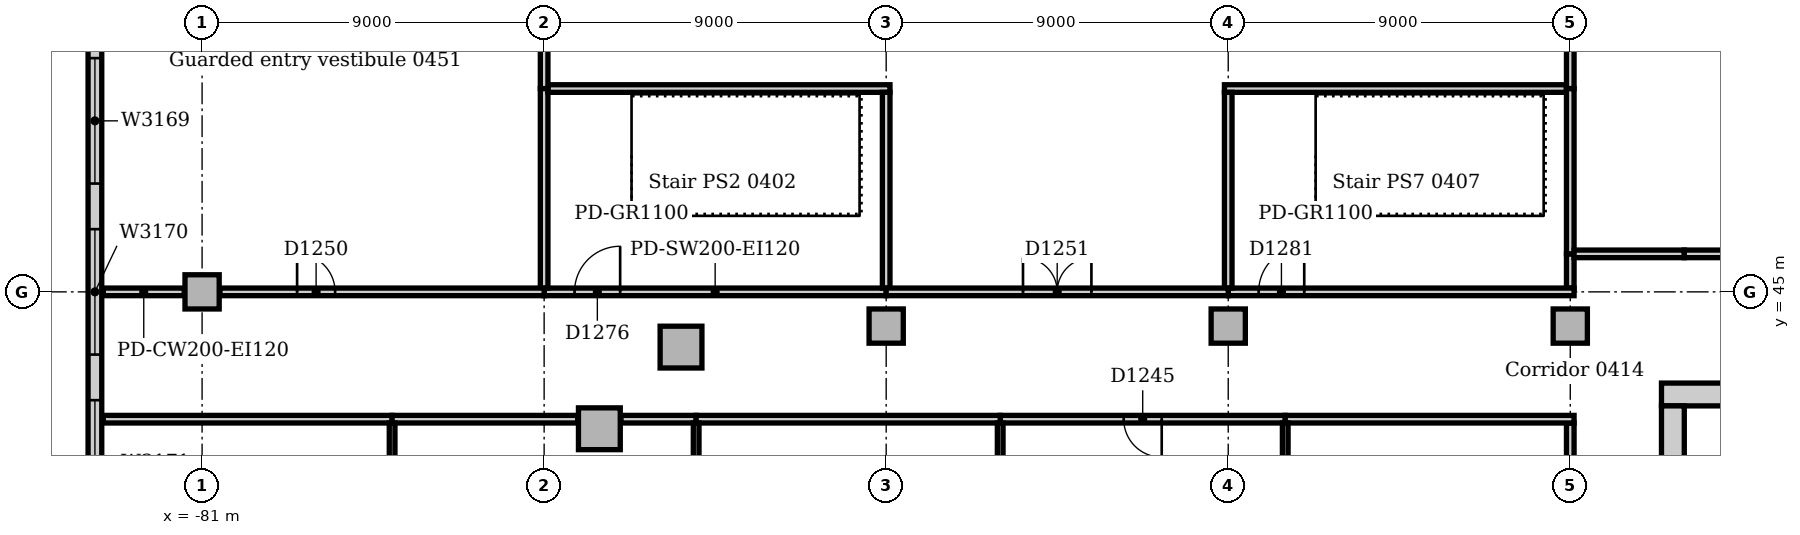
"""IFC4 building model, lengths in metres.
Left out: names, types, materials, properties, quantities, classifications, styles, units other than length and angle.
Written with IfcOpenShell. Run it as: python <this file> out.ifc"""

import sys

from ifc_helpers import new_model, si_unit, direction, frame, frame_2d, origin, origin_2d, place, context, subcontext, project, spatial, rectangle, extrude, element, fill, save


model = new_model("IFC4")
c1 = context("Model", 3, precision=1e-05, world=origin(), true_north=direction((0.0, 1.0)))
c2 = subcontext(c1, "Body", "Model", "MODEL_VIEW")
j1 = project(units=[si_unit("LENGTHUNIT", "METRE"), si_unit("PLANEANGLEUNIT", "RADIAN")], contexts=[c1])
p1 = place(None, origin())
s1 = spatial("IfcSite", under=j1, at=p1, CompositionType="ELEMENT")
p2 = place(p1, origin())
s2 = spatial("IfcBuilding", under=s1, at=p2, CompositionType="ELEMENT")
p3 = place(p2, frame((0.0, 0.0, 21.0)))
s3 = spatial("IfcBuildingStorey", under=s2, at=p3, CompositionType="ELEMENT", Elevation=21.0)
p4 = place(p3, frame((-30.9, 42.3, 0.0), z_axis=(0.0, 0.0, 1.0), x_axis=(-1.0, 0.0, 0.0)))
e1 = element("IfcWall", 1, at=p4, inside=s3, PredefinedType="SOLIDWALL", context=c2, shape_type="SweptSolid", body=[
    extrude(rectangle(XDim=11.7, YDim=0.6, at=frame_2d((5.85, 0.0))), origin(), (0.0, 0.0, 1.0), 5.0),
])
p5 = place(p3, frame((-42.3, 42.0, 0.0), z_axis=(0.0, 0.0, 1.0), x_axis=(0.0, -1.0, 0.0)))
e2 = element("IfcWall", 2, at=p5, inside=s3, PredefinedType="SOLIDWALL", context=c2, shape_type="SweptSolid", body=[
    extrude(rectangle(XDim=11.5, YDim=0.6, at=frame_2d((5.75, 0.0))), origin(), (0.0, 0.0, 1.0), 5.0),
])
p6 = place(p5, frame((8.85, 0.0, 0.0)))
e3 = element("IfcOpeningElement", 3, at=p6, cuts=e2, PredefinedType="OPENING", context=c2, shape_type="SweptSolid", body=[
    extrude(rectangle(XDim=1.8, YDim=2.1, at=frame_2d((0.9, 1.05))), frame((0.0, 0.31, 0.0), z_axis=(0.0, -1.0, 0.0), x_axis=(1.0, 0.0, 0.0)), (0.0, 0.0, 1.0), 0.62),
])
for number, where, z_axis, x_axis in (
    (4, (-68.398, 43.547, 0.0), (0.0, 0.0, 1.0), (1.0, 0.0, 0.0)),
    (5, (-70.547, 41.398, 0.0), (0.0, 0.0, 1.0), (1.0, 0.0, 0.0)),
):
    element("IfcColumn", number, at=place(p3, frame(where, z_axis=z_axis, x_axis=x_axis)), inside=s3, PredefinedType="COLUMN", context=c2, shape_type="SweptSolid", body=[
        extrude(rectangle(XDim=1.1, YDim=1.1, at=origin_2d()), origin(), (0.0, 0.0, 1.0), 4.85),
    ])
for number, where, z_axis, x_axis in (
    (6, (-63.0, 44.1, 0.0), (0.0, 0.0, 1.0), (1.0, 0.0, 0.0)),
    (7, (-54.0, 44.1, 0.0), (0.0, 0.0, 1.0), (1.0, 0.0, 0.0)),
    (8, (-45.0, 44.1, 0.0), (0.0, 0.0, 1.0), (1.0, 0.0, 0.0)),
):
    element("IfcColumn", number, at=place(p3, frame(where, z_axis=z_axis, x_axis=x_axis)), inside=s3, PredefinedType="COLUMN", context=c2, shape_type="SweptSolid", body=[
        extrude(rectangle(XDim=0.9, YDim=0.9, at=origin_2d()), origin(), (0.0, 0.0, 1.0), 4.85),
    ])
p7 = place(p3, frame((-81.0, 45.0, 0.0), z_axis=(0.0, 0.0, 1.0), x_axis=(1.0, 0.0, 0.0)))
e9 = element("IfcColumn", 9, at=p7, inside=s3, PredefinedType="COLUMN", context=c2, shape_type="SweptSolid", body=[
    extrude(rectangle(XDim=0.9, YDim=0.9, at=origin_2d()), origin(), (0.0, 0.0, 1.0), 4.7),
])
p8 = place(p3, frame((-83.82, 54.0, 0.0), z_axis=(0.0, 0.0, 1.0), x_axis=(0.0, -1.0, 0.0)))
e10 = element("IfcWall", 10, at=p8, inside=s3, PredefinedType="STANDARD", context=c2, shape_type="SweptSolid", body=[
    extrude(rectangle(XDim=63.0, YDim=0.36, at=frame_2d((31.5, 0.0))), origin(), (0.0, 0.0, 1.0), 4.85),
])
p9 = place(p8, frame((2.85, 0.0, 0.9)))
e11 = element("IfcOpeningElement", 11, at=p9, cuts=e10, PredefinedType="OPENING", context=c2, shape_type="SweptSolid", body=[
    extrude(rectangle(XDim=3.3, YDim=2.4, at=frame_2d((1.65, 1.2))), frame((0.0, 0.19, 0.0), z_axis=(0.0, -1.0, 0.0), x_axis=(1.0, 0.0, 0.0)), (0.0, 0.0, 1.0), 0.38),
])
p10 = place(p8, frame((7.35, 0.0, 0.9)))
e12 = element("IfcOpeningElement", 12, at=p10, cuts=e10, PredefinedType="OPENING", context=c2, shape_type="SweptSolid", body=[
    extrude(rectangle(XDim=3.3, YDim=2.4, at=frame_2d((1.65, 1.2))), frame((0.0, 0.19, 0.0), z_axis=(0.0, -1.0, 0.0), x_axis=(1.0, 0.0, 0.0)), (0.0, 0.0, 1.0), 0.38),
])
p11 = place(p8, frame((11.85, 0.0, 0.9)))
e13 = element("IfcOpeningElement", 13, at=p11, cuts=e10, PredefinedType="OPENING", context=c2, shape_type="SweptSolid", body=[
    extrude(rectangle(XDim=3.3, YDim=2.4, at=frame_2d((1.65, 1.2))), frame((0.0, 0.19, 0.0), z_axis=(0.0, -1.0, 0.0), x_axis=(1.0, 0.0, 0.0)), (0.0, 0.0, 1.0), 0.38),
])
p12 = place(p8, frame((16.35, 0.0, 0.9)))
e14 = element("IfcOpeningElement", 14, at=p12, cuts=e10, PredefinedType="OPENING", context=c2, shape_type="SweptSolid", body=[
    extrude(rectangle(XDim=3.3, YDim=2.4, at=frame_2d((1.65, 1.2))), frame((0.0, 0.19, 0.0), z_axis=(0.0, -1.0, 0.0), x_axis=(1.0, 0.0, 0.0)), (0.0, 0.0, 1.0), 0.38),
])
p13 = place(p8, frame((20.85, 0.0, 0.9)))
e15 = element("IfcOpeningElement", 15, at=p13, cuts=e10, PredefinedType="OPENING", context=c2, shape_type="SweptSolid", body=[
    extrude(rectangle(XDim=3.3, YDim=2.4, at=frame_2d((1.65, 1.2))), frame((0.0, 0.19, 0.0), z_axis=(0.0, -1.0, 0.0), x_axis=(1.0, 0.0, 0.0)), (0.0, 0.0, 1.0), 0.38),
])
p14 = place(p8, frame((25.35, 0.0, 0.9)))
e16 = element("IfcOpeningElement", 16, at=p14, cuts=e10, PredefinedType="OPENING", context=c2, shape_type="SweptSolid", body=[
    extrude(rectangle(XDim=3.3, YDim=2.4, at=frame_2d((1.65, 1.2))), frame((0.0, 0.19, 0.0), z_axis=(0.0, -1.0, 0.0), x_axis=(1.0, 0.0, 0.0)), (0.0, 0.0, 1.0), 0.38),
])
p15 = place(p8, frame((29.85, 0.0, 0.9)))
e17 = element("IfcOpeningElement", 17, at=p15, cuts=e10, PredefinedType="OPENING", context=c2, shape_type="SweptSolid", body=[
    extrude(rectangle(XDim=3.3, YDim=2.4, at=frame_2d((1.65, 1.2))), frame((0.0, 0.19, 0.0), z_axis=(0.0, -1.0, 0.0), x_axis=(1.0, 0.0, 0.0)), (0.0, 0.0, 1.0), 0.38),
])
p16 = place(p8, frame((34.35, 0.0, 0.9)))
e18 = element("IfcOpeningElement", 18, at=p16, cuts=e10, PredefinedType="OPENING", context=c2, shape_type="SweptSolid", body=[
    extrude(rectangle(XDim=3.3, YDim=2.4, at=frame_2d((1.65, 1.2))), frame((0.0, 0.19, 0.0), z_axis=(0.0, -1.0, 0.0), x_axis=(1.0, 0.0, 0.0)), (0.0, 0.0, 1.0), 0.38),
])
p17 = place(p8, frame((38.85, 0.0, 0.9)))
e19 = element("IfcOpeningElement", 19, at=p17, cuts=e10, PredefinedType="OPENING", context=c2, shape_type="SweptSolid", body=[
    extrude(rectangle(XDim=3.3, YDim=2.4, at=frame_2d((1.65, 1.2))), frame((0.0, 0.19, 0.0), z_axis=(0.0, -1.0, 0.0), x_axis=(1.0, 0.0, 0.0)), (0.0, 0.0, 1.0), 0.38),
])
p18 = place(p8, frame((43.35, 0.0, 0.9)))
e20 = element("IfcOpeningElement", 20, at=p18, cuts=e10, PredefinedType="OPENING", context=c2, shape_type="SweptSolid", body=[
    extrude(rectangle(XDim=3.3, YDim=2.4, at=frame_2d((1.65, 1.2))), frame((0.0, 0.19, 0.0), z_axis=(0.0, -1.0, 0.0), x_axis=(1.0, 0.0, 0.0)), (0.0, 0.0, 1.0), 0.38),
])
p19 = place(p8, frame((47.85, 0.0, 0.9)))
e21 = element("IfcOpeningElement", 21, at=p19, cuts=e10, PredefinedType="OPENING", context=c2, shape_type="SweptSolid", body=[
    extrude(rectangle(XDim=3.3, YDim=2.4, at=frame_2d((1.65, 1.2))), frame((0.0, 0.19, 0.0), z_axis=(0.0, -1.0, 0.0), x_axis=(1.0, 0.0, 0.0)), (0.0, 0.0, 1.0), 0.38),
])
p20 = place(p8, frame((52.35, 0.0, 0.9)))
e22 = element("IfcOpeningElement", 22, at=p20, cuts=e10, PredefinedType="OPENING", context=c2, shape_type="SweptSolid", body=[
    extrude(rectangle(XDim=3.3, YDim=2.4, at=frame_2d((1.65, 1.2))), frame((0.0, 0.19, 0.0), z_axis=(0.0, -1.0, 0.0), x_axis=(1.0, 0.0, 0.0)), (0.0, 0.0, 1.0), 0.38),
])
p21 = place(p8, frame((56.85, 0.0, 0.9)))
e23 = element("IfcOpeningElement", 23, at=p21, cuts=e10, PredefinedType="OPENING", context=c2, shape_type="SweptSolid", body=[
    extrude(rectangle(XDim=3.3, YDim=2.4, at=frame_2d((1.65, 1.2))), frame((0.0, 0.19, 0.0), z_axis=(0.0, -1.0, 0.0), x_axis=(1.0, 0.0, 0.0)), (0.0, 0.0, 1.0), 0.38),
])
p22 = place(p3, frame((-72.0, 45.0, 0.0), z_axis=(0.0, 0.0, 1.0), x_axis=(1.0, 0.0, 0.0)))
e24 = element("IfcWall", 24, at=p22, inside=s3, PredefinedType="SOLIDWALL", context=c2, shape_type="SweptSolid", body=[
    extrude(rectangle(XDim=9.0, YDim=0.2, at=frame_2d((4.5, 0.0))), origin(), (0.0, 0.0, 1.0), 4.7),
])
p23 = place(p22, frame((0.8, 0.0, 0.0)))
e25 = element("IfcOpeningElement", 25, at=p23, cuts=e24, PredefinedType="OPENING", context=c2, shape_type="SweptSolid", body=[
    extrude(rectangle(XDim=1.2, YDim=2.1, at=frame_2d((0.6, 1.05))), frame((0.0, 0.11, 0.0), z_axis=(0.0, -1.0, 0.0), x_axis=(1.0, 0.0, 0.0)), (0.0, 0.0, 1.0), 0.22),
])
p24 = place(p3, frame((-72.0, 45.1, 0.0), z_axis=(0.0, 0.0, 1.0), x_axis=(0.0, 1.0, 0.0)))
e26 = element("IfcWall", 26, at=p24, inside=s3, PredefinedType="SOLIDWALL", context=c2, shape_type="SweptSolid", body=[
    extrude(rectangle(XDim=5.25, YDim=0.2, at=frame_2d((2.625, 0.0))), origin(), (0.0, 0.0, 1.0), 4.7),
])
p25 = place(p3, frame((-71.9, 50.35, 0.0), z_axis=(0.0, 0.0, 1.0), x_axis=(1.0, 0.0, 0.0)))
e27 = element("IfcWall", 27, at=p25, inside=s3, PredefinedType="SOLIDWALL", context=c2, shape_type="SweptSolid", body=[
    extrude(rectangle(XDim=9.0, YDim=0.2, at=frame_2d((4.5, 0.0))), origin(), (0.0, 0.0, 1.0), 4.7),
])
p26 = place(p3, frame((-63.0, 45.1, 0.0), z_axis=(0.0, 0.0, 1.0), x_axis=(0.0, 1.0, 0.0)))
e28 = element("IfcWall", 28, at=p26, inside=s3, PredefinedType="SOLIDWALL", context=c2, shape_type="SweptSolid", body=[
    extrude(rectangle(XDim=5.15, YDim=0.2, at=frame_2d((2.575, 0.0))), origin(), (0.0, 0.0, 1.0), 4.7),
])
p27 = place(p3, frame((-45.0, 45.1, 0.0), z_axis=(0.0, 0.0, 1.0), x_axis=(0.0, 1.0, 0.0)))
e29 = element("IfcWall", 29, at=p27, inside=s3, PredefinedType="SOLIDWALL", context=c2, shape_type="SweptSolid", body=[
    extrude(rectangle(XDim=0.9, YDim=0.2, at=frame_2d((0.45, 0.0))), origin(), (0.0, 0.0, 1.0), 4.7),
])
p28 = place(p3, frame((-54.0, 45.0, 0.0), z_axis=(0.0, 0.0, 1.0), x_axis=(1.0, 0.0, 0.0)))
e30 = element("IfcWall", 30, at=p28, inside=s3, PredefinedType="SOLIDWALL", context=c2, shape_type="SweptSolid", body=[
    extrude(rectangle(XDim=9.1, YDim=0.2, at=frame_2d((4.55, 0.0))), origin(), (0.0, 0.0, 1.0), 4.85),
])
p29 = place(p28, frame((0.8, 0.0, 0.0)))
e31 = element("IfcOpeningElement", 31, at=p29, cuts=e30, PredefinedType="OPENING", context=c2, shape_type="SweptSolid", body=[
    extrude(rectangle(XDim=1.2, YDim=2.1, at=frame_2d((0.6, 1.05))), frame((0.0, 0.11, 0.0), z_axis=(0.0, -1.0, 0.0), x_axis=(1.0, 0.0, 0.0)), (0.0, 0.0, 1.0), 0.22),
])
p30 = place(p3, frame((-54.1, 50.35, 0.0), z_axis=(0.0, 0.0, 1.0), x_axis=(1.0, 0.0, 0.0)))
e32 = element("IfcWall", 32, at=p30, inside=s3, PredefinedType="SOLIDWALL", context=c2, shape_type="SweptSolid", body=[
    extrude(rectangle(XDim=9.0, YDim=0.2, at=frame_2d((4.5, 0.0))), origin(), (0.0, 0.0, 1.0), 4.7),
])
p31 = place(p3, frame((-54.0, 45.1, 0.0), z_axis=(0.0, 0.0, 1.0), x_axis=(0.0, 1.0, 0.0)))
e33 = element("IfcWall", 33, at=p31, inside=s3, PredefinedType="SOLIDWALL", context=c2, shape_type="SweptSolid", body=[
    extrude(rectangle(XDim=5.15, YDim=0.2, at=frame_2d((2.575, 0.0))), origin(), (0.0, 0.0, 1.0), 4.7),
])
p32 = place(p3, frame((-45.0, 46.0, 0.0), z_axis=(0.0, 0.0, 1.0), x_axis=(0.0, 1.0, 0.0)))
e34 = element("IfcWall", 34, at=p32, inside=s3, PredefinedType="SOLIDWALL", context=c2, shape_type="SweptSolid", body=[
    extrude(rectangle(XDim=4.35, YDim=0.2, at=frame_2d((2.175, 0.0))), origin(), (0.0, 0.0, 1.0), 4.7),
])
p33 = place(p3, frame((-45.0, 36.42, 0.0), z_axis=(0.0, 0.0, 1.0), x_axis=(0.0, 1.0, 0.0)))
e35 = element("IfcWall", 35, at=p33, inside=s3, PredefinedType="PARTITIONING", context=c2, shape_type="SweptSolid", body=[
    extrude(rectangle(XDim=5.13, YDim=0.2, at=frame_2d((2.565, 0.0))), origin(), (0.0, 0.0, 1.0), 4.158),
])
p34 = place(p3, frame((-60.0, 41.65, 0.0), z_axis=(0.0, 0.0, 1.0), x_axis=(1.0, 0.0, 0.0)))
e36 = element("IfcWall", 36, at=p34, inside=s3, PredefinedType="PARTITIONING", context=c2, shape_type="SweptSolid", body=[
    extrude(rectangle(XDim=7.5, YDim=0.2, at=frame_2d((3.75, 0.0))), origin(), (0.0, 0.0, 1.0), 4.85),
])
p35 = place(p34, frame((3.25, 0.0, 0.0)))
e37 = element("IfcOpeningElement", 37, at=p35, cuts=e36, PredefinedType="OPENING", context=c2, shape_type="SweptSolid", body=[
    extrude(rectangle(XDim=1.0, YDim=2.1, at=frame_2d((0.5, 1.05))), frame((0.0, 0.11, 0.0), z_axis=(0.0, -1.0, 0.0), x_axis=(1.0, 0.0, 0.0)), (0.0, 0.0, 1.0), 0.22),
])
p36 = place(p3, frame((-52.5, 41.65, 0.0), z_axis=(0.0, 0.0, 1.0), x_axis=(1.0, 0.0, 0.0)))
e38 = element("IfcWall", 38, at=p36, inside=s3, PredefinedType="PARTITIONING", context=c2, shape_type="SweptSolid", body=[
    extrude(rectangle(XDim=7.6, YDim=0.2, at=frame_2d((3.8, 0.0))), origin(), (0.0, 0.0, 1.0), 4.85),
])
p37 = place(p3, frame((-83.6, 45.0, 0.0), z_axis=(0.0, 0.0, 1.0), x_axis=(1.0, 0.0, 0.0)))
e39 = element("IfcWall", 39, at=p37, inside=s3, PredefinedType="PARTITIONING", context=c2, shape_type="SweptSolid", body=[
    extrude(rectangle(XDim=2.13, YDim=0.2, at=frame_2d((1.065, 0.0))), origin(), (0.0, 0.0, 1.0), 4.7),
])
p38 = place(p3, frame((-80.53, 45.0, 0.0), z_axis=(0.0, 0.0, 1.0), x_axis=(1.0, 0.0, 0.0)))
e40 = element("IfcWall", 40, at=p38, inside=s3, PredefinedType="PARTITIONING", context=c2, shape_type="SweptSolid", body=[
    extrude(rectangle(XDim=8.53, YDim=0.2, at=frame_2d((4.265, 0.0))), origin(), (0.0, 0.0, 1.0), 4.7),
])
p39 = place(p38, frame((2.03, 0.0, 0.0)))
e41 = element("IfcOpeningElement", 41, at=p39, cuts=e40, PredefinedType="OPENING", context=c2, shape_type="SweptSolid", body=[
    extrude(rectangle(XDim=1.0, YDim=2.1, at=frame_2d((0.5, 1.05))), frame((0.0, 0.11, 0.0), z_axis=(0.0, -1.0, 0.0), x_axis=(1.0, 0.0, 0.0)), (0.0, 0.0, 1.0), 0.22),
])
p40 = place(p3, frame((-63.0, 45.0, 0.0), z_axis=(0.0, 0.0, 1.0), x_axis=(1.0, 0.0, 0.0)))
e42 = element("IfcWall", 42, at=p40, inside=s3, PredefinedType="PARTITIONING", context=c2, shape_type="SweptSolid", body=[
    extrude(rectangle(XDim=9.0, YDim=0.2, at=frame_2d((4.5, 0.0))), origin(), (0.0, 0.0, 1.0), 4.85),
])
p41 = place(p40, frame((3.6, 0.0, 0.0)))
e43 = element("IfcOpeningElement", 43, at=p41, cuts=e42, PredefinedType="OPENING", context=c2, shape_type="SweptSolid", body=[
    extrude(rectangle(XDim=1.8, YDim=2.1, at=frame_2d((0.9, 1.05))), frame((0.0, 0.11, 0.0), z_axis=(0.0, -1.0, 0.0), x_axis=(1.0, 0.0, 0.0)), (0.0, 0.0, 1.0), 0.22),
])
p42 = place(p3, frame((-44.9, 46.0, 0.0), z_axis=(0.0, 0.0, 1.0), x_axis=(1.0, 0.0, 0.0)))
e44 = element("IfcWall", 44, at=p42, inside=s3, PredefinedType="PARTITIONING", context=c2, shape_type="SweptSolid", body=[
    extrude(rectangle(XDim=2.9, YDim=0.2, at=frame_2d((1.45, 0.0))), origin(), (0.0, 0.0, 1.0), 4.7),
])
p43 = place(p3, frame((-83.6, 41.65, 0.0), z_axis=(0.0, 0.0, 1.0), x_axis=(1.0, 0.0, 0.0)))
e45 = element("IfcWall", 45, at=p43, inside=s3, PredefinedType="PARTITIONING", context=c2, shape_type="SweptSolid", body=[
    extrude(rectangle(XDim=7.6, YDim=0.2, at=frame_2d((3.8, 0.0))), origin(), (0.0, 0.0, 1.0), 4.7),
])
p44 = place(p3, frame((-76.0, 41.65, 0.0), z_axis=(0.0, 0.0, 1.0), x_axis=(1.0, 0.0, 0.0)))
e46 = element("IfcWall", 46, at=p44, inside=s3, PredefinedType="PARTITIONING", context=c2, shape_type="SweptSolid", body=[
    extrude(rectangle(XDim=4.883, YDim=0.2, at=frame_2d((2.442, 0.0))), origin(), (0.0, 0.0, 1.0), 4.7),
])
p45 = place(p3, frame((-69.977, 41.65, 0.0), z_axis=(0.0, 0.0, 1.0), x_axis=(1.0, 0.0, 0.0)))
e47 = element("IfcWall", 47, at=p45, inside=s3, PredefinedType="PARTITIONING", context=c2, shape_type="SweptSolid", body=[
    extrude(rectangle(XDim=1.977, YDim=0.2, at=frame_2d((0.989, 0.0))), origin(), (0.0, 0.0, 1.0), 4.85),
])
p46 = place(p3, frame((-68.0, 41.65, 0.0), z_axis=(0.0, 0.0, 1.0), x_axis=(1.0, 0.0, 0.0)))
e48 = element("IfcWall", 48, at=p46, inside=s3, PredefinedType="PARTITIONING", context=c2, shape_type="SweptSolid", body=[
    extrude(rectangle(XDim=8.0, YDim=0.2, at=frame_2d((4.0, 0.0))), origin(), (0.0, 0.0, 1.0), 4.85),
])
p47 = place(p3, frame((-42.0, 46.0, 0.0), z_axis=(0.0, 0.0, 1.0), x_axis=(1.0, 0.0, 0.0)))
e49 = element("IfcWall", 49, at=p47, inside=s3, PredefinedType="PARTITIONING", context=c2, shape_type="SweptSolid", body=[
    extrude(rectangle(XDim=6.0, YDim=0.2, at=frame_2d((3.0, 0.0))), origin(), (0.0, 0.0, 1.0), 4.7),
])
p48 = place(p47, frame((2.5, 0.0, 0.0)))
e50 = element("IfcOpeningElement", 50, at=p48, cuts=e49, PredefinedType="OPENING", context=c2, shape_type="SweptSolid", body=[
    extrude(rectangle(XDim=1.0, YDim=2.1, at=frame_2d((0.5, 1.05))), frame((0.0, 0.11, 0.0), z_axis=(0.0, -1.0, 0.0), x_axis=(1.0, 0.0, 0.0)), (0.0, 0.0, 1.0), 0.22),
])
for number, where, z_axis, x_axis in (
    (51, (-52.5, 33.75, 0.0), (0.0, 0.0, 1.0), (0.0, 1.0, 0.0)),
    (52, (-60.0, 33.75, 0.0), (0.0, 0.0, 1.0), (0.0, 1.0, 0.0)),
):
    element("IfcWall", number, at=place(p3, frame(where, z_axis=z_axis, x_axis=x_axis)), inside=s3, PredefinedType="PARTITIONING", context=c2, shape_type="SweptSolid", body=[
        extrude(rectangle(XDim=7.8, YDim=0.15, at=frame_2d((3.9, 0.0))), origin(), (0.0, 0.0, 1.0), 4.85),
    ])
for number, where, z_axis, x_axis in (
    (53, (-72.0, 50.35, 0.0), (0.0, 0.0, 1.0), (0.0, 1.0, 0.0)),
    (54, (-45.0, 50.35, 0.0), (0.0, 0.0, 1.0), (0.0, 1.0, 0.0)),
):
    element("IfcWall", number, at=place(p3, frame(where, z_axis=z_axis, x_axis=x_axis)), inside=s3, PredefinedType="PARTITIONING", context=c2, shape_type="SweptSolid", body=[
        extrude(rectangle(XDim=3.18, YDim=0.2, at=frame_2d((1.59, 0.0))), origin(), (0.0, 0.0, 1.0), 4.7),
    ])
p49 = place(p3, frame((-76.0, 24.1, 0.0), z_axis=(0.0, 0.0, 1.0), x_axis=(0.0, 1.0, 0.0)))
e55 = element("IfcWall", 55, at=p49, inside=s3, PredefinedType="PARTITIONING", context=c2, shape_type="SweptSolid", body=[
    extrude(rectangle(XDim=17.45, YDim=0.15, at=frame_2d((8.725, 0.0))), origin(), (0.0, 0.0, 1.0), 4.7),
])
p50 = place(p3, frame((-68.0, 24.1, 0.0), z_axis=(0.0, 0.0, 1.0), x_axis=(0.0, 1.0, 0.0)))
e56 = element("IfcWall", 56, at=p50, inside=s3, PredefinedType="PARTITIONING", context=c2, shape_type="SweptSolid", body=[
    extrude(rectangle(XDim=17.45, YDim=0.15, at=frame_2d((8.725, 0.0))), origin(), (0.0, 0.0, 1.0), 4.85),
])
p51 = place(p9, origin())
e57 = element("IfcWindow", 57, at=p51, inside=s3, PartitioningType="SINGLE_PANEL", PredefinedType="WINDOW", context=c2, shape_type="SweptSolid", body=[
    extrude(rectangle(XDim=3.3, YDim=2.4, at=frame_2d((1.65, 1.2))), frame((0.0, 0.13, 0.0), z_axis=(0.0, -1.0, 0.0), x_axis=(1.0, 0.0, 0.0)), (0.0, 0.0, 1.0), 0.06),
])
fill(e11, e57)
p52 = place(p10, origin())
e58 = element("IfcWindow", 58, at=p52, inside=s3, PartitioningType="SINGLE_PANEL", PredefinedType="WINDOW", context=c2, shape_type="SweptSolid", body=[
    extrude(rectangle(XDim=3.3, YDim=2.4, at=frame_2d((1.65, 1.2))), frame((0.0, 0.13, 0.0), z_axis=(0.0, -1.0, 0.0), x_axis=(1.0, 0.0, 0.0)), (0.0, 0.0, 1.0), 0.06),
])
fill(e12, e58)
p53 = place(p11, origin())
e59 = element("IfcWindow", 59, at=p53, inside=s3, PartitioningType="SINGLE_PANEL", PredefinedType="WINDOW", context=c2, shape_type="SweptSolid", body=[
    extrude(rectangle(XDim=3.3, YDim=2.4, at=frame_2d((1.65, 1.2))), frame((0.0, 0.13, 0.0), z_axis=(0.0, -1.0, 0.0), x_axis=(1.0, 0.0, 0.0)), (0.0, 0.0, 1.0), 0.06),
])
fill(e13, e59)
p54 = place(p35, frame((1.0, 0.0, 0.0), z_axis=(0.0, 0.0, 1.0), x_axis=(-1.0, 0.0, 0.0)))
e60 = element("IfcDoor", 60, at=p54, inside=s3, OperationType="SINGLE_SWING_LEFT", PredefinedType="DOOR", context=c2, shape_type="SweptSolid", body=[
    extrude(rectangle(XDim=1.0, YDim=2.1, at=frame_2d((0.5, 1.05))), frame((0.0, 0.025, 0.0), z_axis=(0.0, -1.0, 0.0), x_axis=(1.0, 0.0, 0.0)), (0.0, 0.0, 1.0), 0.05),
])
fill(e37, e60)
p55 = place(p39, origin())
e61 = element("IfcDoor", 61, at=p55, inside=s3, OperationType="SINGLE_SWING_LEFT", PredefinedType="DOOR", context=c2, shape_type="SweptSolid", body=[
    extrude(rectangle(XDim=1.0, YDim=2.1, at=frame_2d((0.5, 1.05))), frame((0.0, 0.025, 0.0), z_axis=(0.0, -1.0, 0.0), x_axis=(1.0, 0.0, 0.0)), (0.0, 0.0, 1.0), 0.05),
])
fill(e41, e61)
p56 = place(p41, origin())
e62 = element("IfcDoor", 62, at=p56, inside=s3, OperationType="DOUBLE_DOOR_SINGLE_SWING", PredefinedType="DOOR", context=c2, shape_type="SweptSolid", body=[
    extrude(rectangle(XDim=1.8, YDim=2.1, at=frame_2d((0.9, 1.05))), frame((0.0, 0.025, 0.0), z_axis=(0.0, -1.0, 0.0), x_axis=(1.0, 0.0, 0.0)), (0.0, 0.0, 1.0), 0.05),
])
fill(e43, e62)
p57 = place(p23, origin())
e63 = element("IfcDoor", 63, at=p57, inside=s3, OperationType="SINGLE_SWING_RIGHT", PredefinedType="DOOR", context=c2, shape_type="SweptSolid", body=[
    extrude(rectangle(XDim=1.2, YDim=2.1, at=frame_2d((0.6, 1.05))), frame((0.0, 0.025, 0.0), z_axis=(0.0, -1.0, 0.0), x_axis=(1.0, 0.0, 0.0)), (0.0, 0.0, 1.0), 0.05),
])
fill(e25, e63)
p58 = place(p29, origin())
e64 = element("IfcDoor", 64, at=p58, inside=s3, OperationType="SINGLE_SWING_RIGHT", PredefinedType="DOOR", context=c2, shape_type="SweptSolid", body=[
    extrude(rectangle(XDim=1.2, YDim=2.1, at=frame_2d((0.6, 1.05))), frame((0.0, 0.025, 0.0), z_axis=(0.0, -1.0, 0.0), x_axis=(1.0, 0.0, 0.0)), (0.0, 0.0, 1.0), 0.05),
])
fill(e31, e64)
save(model, sys.argv[1])
